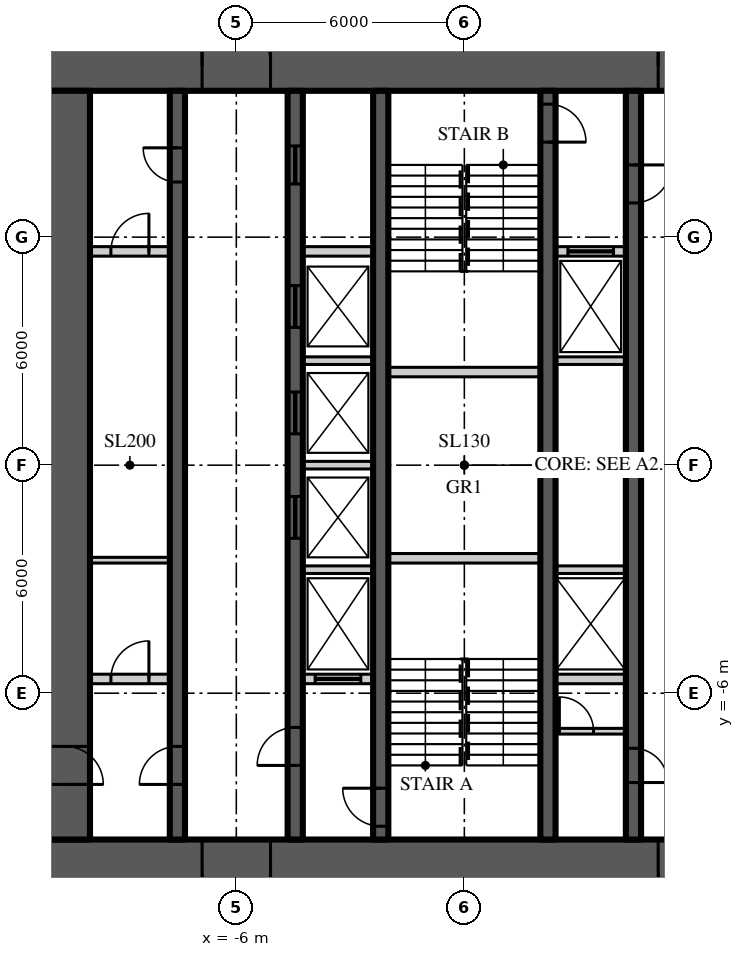
"""IFC4 building model, lengths in metres.
Left out: names, types, materials, properties, quantities, classifications, styles, units other than length and angle.
Written with IfcOpenShell. Run it as: python <this file> out.ifc"""

import sys

from ifc_helpers import new_model, si_unit, direction, frame, frame_2d, origin, place, context, subcontext, project, spatial, rectangle, extrude, element, fill, save


model = new_model("IFC4")
c1 = context("Model", 3, precision=1e-05, world=origin(), true_north=direction((0.0, 1.0)))
c2 = subcontext(c1, "Body", "Model", "MODEL_VIEW")
j1 = project(units=[si_unit("LENGTHUNIT", "METRE"), si_unit("PLANEANGLEUNIT", "RADIAN")], contexts=[c1])
p1 = place(None, origin())
s1 = spatial("IfcSite", under=j1, at=p1, CompositionType="ELEMENT")
p2 = place(p1, origin())
s2 = spatial("IfcBuilding", under=s1, at=p2, CompositionType="ELEMENT")
p3 = place(p2, frame((0.0, 0.0, 132.0)))
s3 = spatial("IfcBuildingStorey", under=s2, at=p3, CompositionType="ELEMENT", Elevation=132.0)
p4 = place(p3, frame((-11.15, 10.5, 0.0), z_axis=(0.0, 0.0, 1.0), x_axis=(1.0, 0.0, 0.0)))
e1 = element("IfcWall", 1, at=p4, inside=s3, PredefinedType="SHEAR", context=c2, shape_type="SweptSolid", body=[
    extrude(rectangle(XDim=22.3, YDim=1.3, at=frame_2d((11.15, 0.0))), origin(), (0.0, 0.0, 1.0), 3.9),
])
p5 = place(p4, frame((4.25, 0.0, 0.0)))
e2 = element("IfcOpeningElement", 2, at=p5, cuts=e1, PredefinedType="OPENING", context=c2, shape_type="SweptSolid", body=[
    extrude(rectangle(XDim=1.8, YDim=2.2, at=frame_2d((0.9, 1.1))), frame((0.0, 0.66, 0.0), z_axis=(0.0, -1.0, 0.0), x_axis=(1.0, 0.0, 0.0)), (0.0, 0.0, 1.0), 1.32),
])
p6 = place(p4, frame((16.25, 0.0, 0.0)))
e3 = element("IfcOpeningElement", 3, at=p6, cuts=e1, PredefinedType="OPENING", context=c2, shape_type="SweptSolid", body=[
    extrude(rectangle(XDim=1.8, YDim=2.2, at=frame_2d((0.9, 1.1))), frame((0.0, 0.66, 0.0), z_axis=(0.0, -1.0, 0.0), x_axis=(1.0, 0.0, 0.0)), (0.0, 0.0, 1.0), 1.32),
])
p7 = place(p3, frame((11.15, -10.5, 0.0), z_axis=(0.0, 0.0, 1.0), x_axis=(-1.0, 0.0, 0.0)))
e4 = element("IfcWall", 4, at=p7, inside=s3, PredefinedType="SHEAR", context=c2, shape_type="SweptSolid", body=[
    extrude(rectangle(XDim=22.3, YDim=1.3, at=frame_2d((11.15, 0.0))), origin(), (0.0, 0.0, 1.0), 3.9),
])
p8 = place(p7, frame((16.25, 0.0, 0.0)))
e5 = element("IfcOpeningElement", 5, at=p8, cuts=e4, PredefinedType="OPENING", context=c2, shape_type="SweptSolid", body=[
    extrude(rectangle(XDim=1.8, YDim=2.2, at=frame_2d((0.9, 1.1))), frame((0.0, 0.66, 0.0), z_axis=(0.0, -1.0, 0.0), x_axis=(1.0, 0.0, 0.0)), (0.0, 0.0, 1.0), 1.32),
])
p9 = place(p7, frame((4.25, 0.0, 0.0)))
e6 = element("IfcOpeningElement", 6, at=p9, cuts=e4, PredefinedType="OPENING", context=c2, shape_type="SweptSolid", body=[
    extrude(rectangle(XDim=1.8, YDim=2.2, at=frame_2d((0.9, 1.1))), frame((0.0, 0.66, 0.0), z_axis=(0.0, -1.0, 0.0), x_axis=(1.0, 0.0, 0.0)), (0.0, 0.0, 1.0), 1.32),
])
p10 = place(p3, frame((-10.5, 9.85, 0.0), z_axis=(0.0, 0.0, 1.0), x_axis=(0.0, -1.0, 0.0)))
e7 = element("IfcWall", 7, at=p10, inside=s3, PredefinedType="SHEAR", context=c2, shape_type="SweptSolid", body=[
    extrude(rectangle(XDim=19.7, YDim=1.3, at=frame_2d((9.85, 0.0))), origin(), (0.0, 0.0, 1.0), 3.9),
])
p11 = place(p10, frame((17.25, 0.0, 0.0)))
e8 = element("IfcOpeningElement", 8, at=p11, cuts=e7, PredefinedType="OPENING", context=c2, shape_type="SweptSolid", body=[
    extrude(rectangle(XDim=1.0, YDim=2.2, at=frame_2d((0.5, 1.1))), frame((0.0, 0.66, 0.0), z_axis=(0.0, -1.0, 0.0), x_axis=(1.0, 0.0, 0.0)), (0.0, 0.0, 1.0), 1.32),
])
p12 = place(p3, frame((-7.55, -9.85, 0.0), z_axis=(0.0, 0.0, 1.0), x_axis=(0.0, 1.0, 0.0)))
e9 = element("IfcWall", 9, at=p12, inside=s3, PredefinedType="SHEAR", context=c2, shape_type="SweptSolid", body=[
    extrude(rectangle(XDim=19.7, YDim=0.4, at=frame_2d((9.85, 0.0))), origin(), (0.0, 0.0, 1.0), 3.9),
])
p13 = place(p12, frame((1.45, 0.0, 0.0)))
e10 = element("IfcOpeningElement", 10, at=p13, cuts=e9, PredefinedType="OPENING", context=c2, shape_type="SweptSolid", body=[
    extrude(rectangle(XDim=1.0, YDim=2.2, at=frame_2d((0.5, 1.1))), frame((0.0, 0.21, 0.0), z_axis=(0.0, -1.0, 0.0), x_axis=(1.0, 0.0, 0.0)), (0.0, 0.0, 1.0), 0.42),
])
p14 = place(p12, frame((17.3, 0.0, 0.0)))
e11 = element("IfcOpeningElement", 11, at=p14, cuts=e9, PredefinedType="OPENING", context=c2, shape_type="SweptSolid", body=[
    extrude(rectangle(XDim=0.9, YDim=2.1, at=frame_2d((0.45, 1.05))), frame((0.0, 0.21, 0.0), z_axis=(0.0, -1.0, 0.0), x_axis=(1.0, 0.0, 0.0)), (0.0, 0.0, 1.0), 0.42),
])
p15 = place(p3, frame((-4.45, -9.85, 0.0), z_axis=(0.0, 0.0, 1.0), x_axis=(0.0, 1.0, 0.0)))
e12 = element("IfcWall", 12, at=p15, inside=s3, PredefinedType="SHEAR", context=c2, shape_type="SweptSolid", body=[
    extrude(rectangle(XDim=19.7, YDim=0.4, at=frame_2d((9.85, 0.0))), origin(), (0.0, 0.0, 1.0), 3.9),
])
p16 = place(p15, frame((1.95, 0.0, 0.0)))
e13 = element("IfcOpeningElement", 13, at=p16, cuts=e12, PredefinedType="OPENING", context=c2, shape_type="SweptSolid", body=[
    extrude(rectangle(XDim=1.0, YDim=2.2, at=frame_2d((0.5, 1.1))), frame((0.0, 0.21, 0.0), z_axis=(0.0, -1.0, 0.0), x_axis=(1.0, 0.0, 0.0)), (0.0, 0.0, 1.0), 0.42),
])
p17 = place(p15, frame((17.25, 0.0, 0.0)))
e14 = element("IfcOpeningElement", 14, at=p17, cuts=e12, PredefinedType="OPENING", context=c2, shape_type="SweptSolid", body=[
    extrude(rectangle(XDim=1.0, YDim=2.1, at=frame_2d((0.5, 1.05))), frame((0.0, 0.21, 0.0), z_axis=(0.0, -1.0, 0.0), x_axis=(1.0, 0.0, 0.0)), (0.0, 0.0, 1.0), 0.42),
])
p18 = place(p15, frame((7.925, 0.0, 0.0)))
e15 = element("IfcOpeningElement", 15, at=p18, cuts=e12, PredefinedType="OPENING", context=c2, shape_type="SweptSolid", body=[
    extrude(rectangle(XDim=1.1, YDim=2.2, at=frame_2d((0.55, 1.1))), frame((0.0, 0.21, 0.0), z_axis=(0.0, -1.0, 0.0), x_axis=(1.0, 0.0, 0.0)), (0.0, 0.0, 1.0), 0.42),
])
p19 = place(p15, frame((10.675, 0.0, 0.0)))
e16 = element("IfcOpeningElement", 16, at=p19, cuts=e12, PredefinedType="OPENING", context=c2, shape_type="SweptSolid", body=[
    extrude(rectangle(XDim=1.1, YDim=2.2, at=frame_2d((0.55, 1.1))), frame((0.0, 0.21, 0.0), z_axis=(0.0, -1.0, 0.0), x_axis=(1.0, 0.0, 0.0)), (0.0, 0.0, 1.0), 0.42),
])
p20 = place(p15, frame((13.475, 0.0, 0.0)))
e17 = element("IfcOpeningElement", 17, at=p20, cuts=e12, PredefinedType="OPENING", context=c2, shape_type="SweptSolid", body=[
    extrude(rectangle(XDim=1.1, YDim=2.2, at=frame_2d((0.55, 1.1))), frame((0.0, 0.21, 0.0), z_axis=(0.0, -1.0, 0.0), x_axis=(1.0, 0.0, 0.0)), (0.0, 0.0, 1.0), 0.42),
])
p21 = place(p3, frame((4.45, 9.85, 0.0), z_axis=(0.0, 0.0, 1.0), x_axis=(0.0, -1.0, 0.0)))
e18 = element("IfcWall", 18, at=p21, inside=s3, PredefinedType="SHEAR", context=c2, shape_type="SweptSolid", body=[
    extrude(rectangle(XDim=19.7, YDim=0.4, at=frame_2d((9.85, 0.0))), origin(), (0.0, 0.0, 1.0), 3.9),
])
p22 = place(p21, frame((1.95, 0.0, 0.0)))
e19 = element("IfcOpeningElement", 19, at=p22, cuts=e18, PredefinedType="OPENING", context=c2, shape_type="SweptSolid", body=[
    extrude(rectangle(XDim=1.0, YDim=2.2, at=frame_2d((0.5, 1.1))), frame((0.0, 0.21, 0.0), z_axis=(0.0, -1.0, 0.0), x_axis=(1.0, 0.0, 0.0)), (0.0, 0.0, 1.0), 0.42),
])
p23 = place(p21, frame((17.3, 0.0, 0.0)))
e20 = element("IfcOpeningElement", 20, at=p23, cuts=e18, PredefinedType="OPENING", context=c2, shape_type="SweptSolid", body=[
    extrude(rectangle(XDim=0.9, YDim=2.1, at=frame_2d((0.45, 1.05))), frame((0.0, 0.21, 0.0), z_axis=(0.0, -1.0, 0.0), x_axis=(1.0, 0.0, 0.0)), (0.0, 0.0, 1.0), 0.42),
])
p24 = place(p3, frame((-2.2, -9.85, 0.0), z_axis=(0.0, 0.0, 1.0), x_axis=(0.0, 1.0, 0.0)))
e21 = element("IfcWall", 21, at=p24, inside=s3, PredefinedType="SHEAR", context=c2, shape_type="SweptSolid", body=[
    extrude(rectangle(XDim=19.7, YDim=0.4, at=frame_2d((9.85, 0.0))), origin(), (0.0, 0.0, 1.0), 3.9),
])
p25 = place(p24, frame((0.35, 0.0, 0.0)))
e22 = element("IfcOpeningElement", 22, at=p25, cuts=e21, PredefinedType="OPENING", context=c2, shape_type="SweptSolid", body=[
    extrude(rectangle(XDim=1.0, YDim=2.2, at=frame_2d((0.5, 1.1))), frame((0.0, 0.21, 0.0), z_axis=(0.0, -1.0, 0.0), x_axis=(1.0, 0.0, 0.0)), (0.0, 0.0, 1.0), 0.42),
])
p26 = place(p3, frame((2.2, 9.85, 0.0), z_axis=(0.0, 0.0, 1.0), x_axis=(0.0, -1.0, 0.0)))
e23 = element("IfcWall", 23, at=p26, inside=s3, PredefinedType="SHEAR", context=c2, shape_type="SweptSolid", body=[
    extrude(rectangle(XDim=19.7, YDim=0.4, at=frame_2d((9.85, 0.0))), origin(), (0.0, 0.0, 1.0), 3.9),
])
p27 = place(p26, frame((0.35, 0.0, 0.0)))
e24 = element("IfcOpeningElement", 24, at=p27, cuts=e23, PredefinedType="OPENING", context=c2, shape_type="SweptSolid", body=[
    extrude(rectangle(XDim=1.0, YDim=2.2, at=frame_2d((0.5, 1.1))), frame((0.0, 0.21, 0.0), z_axis=(0.0, -1.0, 0.0), x_axis=(1.0, 0.0, 0.0)), (0.0, 0.0, 1.0), 0.42),
])
p28 = place(p3, frame((-9.85, 5.625, 0.0), z_axis=(0.0, 0.0, 1.0), x_axis=(1.0, 0.0, 0.0)))
e25 = element("IfcWall", 25, at=p28, inside=s3, PredefinedType="SOLIDWALL", context=c2, shape_type="SweptSolid", body=[
    extrude(rectangle(XDim=2.1, YDim=0.25, at=frame_2d((1.05, 0.0))), origin(), (0.0, 0.0, 1.0), 3.7),
])
p29 = place(p28, frame((0.55, 0.0, 0.0)))
e26 = element("IfcOpeningElement", 26, at=p29, cuts=e25, PredefinedType="OPENING", context=c2, shape_type="SweptSolid", body=[
    extrude(rectangle(XDim=1.0, YDim=2.2, at=frame_2d((0.5, 1.1))), frame((0.0, 0.135, 0.0), z_axis=(0.0, -1.0, 0.0), x_axis=(1.0, 0.0, 0.0)), (0.0, 0.0, 1.0), 0.27),
])
p30 = place(p3, frame((-4.25, 5.625, 0.0), z_axis=(0.0, 0.0, 1.0), x_axis=(1.0, 0.0, 0.0)))
e27 = element("IfcWall", 27, at=p30, inside=s3, PredefinedType="SOLIDWALL", context=c2, shape_type="SweptSolid", body=[
    extrude(rectangle(XDim=1.85, YDim=0.25, at=frame_2d((0.925, 0.0))), origin(), (0.0, 0.0, 1.0), 3.7),
])
p31 = place(p3, frame((2.4, 5.625, 0.0), z_axis=(0.0, 0.0, 1.0), x_axis=(1.0, 0.0, 0.0)))
e28 = element("IfcWall", 28, at=p31, inside=s3, PredefinedType="SOLIDWALL", context=c2, shape_type="SweptSolid", body=[
    extrude(rectangle(XDim=1.85, YDim=0.25, at=frame_2d((0.925, 0.0))), origin(), (0.0, 0.0, 1.0), 3.7),
])
p32 = place(p31, frame((0.325, 0.0, 0.0)))
e29 = element("IfcOpeningElement", 29, at=p32, cuts=e28, PredefinedType="OPENING", context=c2, shape_type="SweptSolid", body=[
    extrude(rectangle(XDim=1.2, YDim=2.2, at=frame_2d((0.6, 1.1))), frame((0.0, 0.135, 0.0), z_axis=(0.0, -1.0, 0.0), x_axis=(1.0, 0.0, 0.0)), (0.0, 0.0, 1.0), 0.27),
])
p33 = place(p3, frame((-9.85, -5.625, 0.0), z_axis=(0.0, 0.0, 1.0), x_axis=(1.0, 0.0, 0.0)))
e30 = element("IfcWall", 30, at=p33, inside=s3, PredefinedType="SOLIDWALL", context=c2, shape_type="SweptSolid", body=[
    extrude(rectangle(XDim=2.1, YDim=0.25, at=frame_2d((1.05, 0.0))), origin(), (0.0, 0.0, 1.0), 3.7),
])
p34 = place(p33, frame((0.55, 0.0, 0.0)))
e31 = element("IfcOpeningElement", 31, at=p34, cuts=e30, PredefinedType="OPENING", context=c2, shape_type="SweptSolid", body=[
    extrude(rectangle(XDim=1.0, YDim=2.2, at=frame_2d((0.5, 1.1))), frame((0.0, 0.135, 0.0), z_axis=(0.0, -1.0, 0.0), x_axis=(1.0, 0.0, 0.0)), (0.0, 0.0, 1.0), 0.27),
])
p35 = place(p3, frame((-4.25, -5.625, 0.0), z_axis=(0.0, 0.0, 1.0), x_axis=(1.0, 0.0, 0.0)))
e32 = element("IfcWall", 32, at=p35, inside=s3, PredefinedType="SOLIDWALL", context=c2, shape_type="SweptSolid", body=[
    extrude(rectangle(XDim=1.85, YDim=0.25, at=frame_2d((0.925, 0.0))), origin(), (0.0, 0.0, 1.0), 3.7),
])
p36 = place(p35, frame((0.325, 0.0, 0.0)))
e33 = element("IfcOpeningElement", 33, at=p36, cuts=e32, PredefinedType="OPENING", context=c2, shape_type="SweptSolid", body=[
    extrude(rectangle(XDim=1.2, YDim=2.2, at=frame_2d((0.6, 1.1))), frame((0.0, 0.135, 0.0), z_axis=(0.0, -1.0, 0.0), x_axis=(1.0, 0.0, 0.0)), (0.0, 0.0, 1.0), 0.27),
])
p37 = place(p3, frame((2.4, -5.625, 0.0), z_axis=(0.0, 0.0, 1.0), x_axis=(1.0, 0.0, 0.0)))
e34 = element("IfcWall", 34, at=p37, inside=s3, PredefinedType="SOLIDWALL", context=c2, shape_type="SweptSolid", body=[
    extrude(rectangle(XDim=1.85, YDim=0.25, at=frame_2d((0.925, 0.0))), origin(), (0.0, 0.0, 1.0), 3.7),
])
for number, where, z_axis, x_axis in (
    (35, (-2.0, -2.45, 0.0), (0.0, 0.0, 1.0), (1.0, 0.0, 0.0)),
    (36, (-2.0, 2.45, 0.0), (0.0, 0.0, 1.0), (1.0, 0.0, 0.0)),
):
    element("IfcWall", number, at=place(p3, frame(where, z_axis=z_axis, x_axis=x_axis)), inside=s3, PredefinedType="SOLIDWALL", context=c2, shape_type="SweptSolid", body=[
        extrude(rectangle(XDim=4.0, YDim=0.25, at=frame_2d((2.0, 0.0))), origin(), (0.0, 0.0, 1.0), 3.7),
    ])
for number, where, z_axis, x_axis in (
    (37, (-4.25, -2.75, 0.0), (0.0, 0.0, 1.0), (1.0, 0.0, 0.0)),
    (38, (2.4, -2.75, 0.0), (0.0, 0.0, 1.0), (1.0, 0.0, 0.0)),
    (39, (-4.25, 0.0, 0.0), (0.0, 0.0, 1.0), (1.0, 0.0, 0.0)),
    (40, (-4.25, 2.75, 0.0), (0.0, 0.0, 1.0), (1.0, 0.0, 0.0)),
    (41, (2.4, 2.75, 0.0), (0.0, 0.0, 1.0), (1.0, 0.0, 0.0)),
):
    element("IfcWall", number, at=place(p3, frame(where, z_axis=z_axis, x_axis=x_axis)), inside=s3, PredefinedType="SOLIDWALL", context=c2, shape_type="SweptSolid", body=[
        extrude(rectangle(XDim=1.85, YDim=0.2, at=frame_2d((0.925, 0.0))), origin(), (0.0, 0.0, 1.0), 3.7),
    ])
p38 = place(p3, frame((-9.85, -2.5, 0.0), z_axis=(0.0, 0.0, 1.0), x_axis=(1.0, 0.0, 0.0)))
e42 = element("IfcWall", 42, at=p38, inside=s3, PredefinedType="SOLIDWALL", context=c2, shape_type="SweptSolid", body=[
    extrude(rectangle(XDim=2.1, YDim=0.15, at=frame_2d((1.05, 0.0))), origin(), (0.0, 0.0, 1.0), 3.77),
])
p39 = place(p3, frame((2.4, -7.0, 0.0), z_axis=(0.0, 0.0, 1.0), x_axis=(1.0, 0.0, 0.0)))
e43 = element("IfcWall", 43, at=p39, inside=s3, PredefinedType="SOLIDWALL", context=c2, shape_type="SweptSolid", body=[
    extrude(rectangle(XDim=1.85, YDim=0.15, at=frame_2d((0.925, 0.0))), origin(), (0.0, 0.0, 1.0), 3.77),
])
p40 = place(p39, frame((0.1, 0.0, 0.0)))
e44 = element("IfcOpeningElement", 44, at=p40, cuts=e43, PredefinedType="OPENING", context=c2, shape_type="SweptSolid", body=[
    extrude(rectangle(XDim=0.9, YDim=2.1, at=frame_2d((0.45, 1.05))), frame((0.0, 0.085, 0.0), z_axis=(0.0, -1.0, 0.0), x_axis=(1.0, 0.0, 0.0)), (0.0, 0.0, 1.0), 0.17),
])
p41 = place(p5, origin())
e45 = element("IfcDoor", 45, at=p41, inside=s3, OperationType="DOUBLE_DOOR_DOUBLE_SWING", PredefinedType="DOOR", context=c2, shape_type="SweptSolid", body=[
    extrude(rectangle(XDim=1.8, YDim=2.2, at=frame_2d((0.9, 1.1))), frame((0.0, 0.025, 0.0), z_axis=(0.0, -1.0, 0.0), x_axis=(1.0, 0.0, 0.0)), (0.0, 0.0, 1.0), 0.05),
])
fill(e2, e45)
p42 = place(p8, origin())
e46 = element("IfcDoor", 46, at=p42, inside=s3, OperationType="DOUBLE_DOOR_DOUBLE_SWING", PredefinedType="DOOR", context=c2, shape_type="SweptSolid", body=[
    extrude(rectangle(XDim=1.8, YDim=2.2, at=frame_2d((0.9, 1.1))), frame((0.0, 0.025, 0.0), z_axis=(0.0, -1.0, 0.0), x_axis=(1.0, 0.0, 0.0)), (0.0, 0.0, 1.0), 0.05),
])
fill(e5, e46)
p43 = place(p6, origin())
e47 = element("IfcDoor", 47, at=p43, inside=s3, OperationType="DOUBLE_DOOR_DOUBLE_SWING", PredefinedType="DOOR", context=c2, shape_type="SweptSolid", body=[
    extrude(rectangle(XDim=1.8, YDim=2.2, at=frame_2d((0.9, 1.1))), frame((0.0, 0.025, 0.0), z_axis=(0.0, -1.0, 0.0), x_axis=(1.0, 0.0, 0.0)), (0.0, 0.0, 1.0), 0.05),
])
fill(e3, e47)
p44 = place(p9, origin())
e48 = element("IfcDoor", 48, at=p44, inside=s3, OperationType="DOUBLE_DOOR_DOUBLE_SWING", PredefinedType="DOOR", context=c2, shape_type="SweptSolid", body=[
    extrude(rectangle(XDim=1.8, YDim=2.2, at=frame_2d((0.9, 1.1))), frame((0.0, 0.025, 0.0), z_axis=(0.0, -1.0, 0.0), x_axis=(1.0, 0.0, 0.0)), (0.0, 0.0, 1.0), 0.05),
])
fill(e6, e48)
p45 = place(p13, origin())
e49 = element("IfcDoor", 49, at=p45, inside=s3, OperationType="SINGLE_SWING_LEFT", PredefinedType="DOOR", context=c2, shape_type="SweptSolid", body=[
    extrude(rectangle(XDim=1.0, YDim=2.2, at=frame_2d((0.5, 1.1))), frame((0.0, 0.025, 0.0), z_axis=(0.0, -1.0, 0.0), x_axis=(1.0, 0.0, 0.0)), (0.0, 0.0, 1.0), 0.05),
])
fill(e10, e49)
p46 = place(p11, origin())
e50 = element("IfcDoor", 50, at=p46, inside=s3, OperationType="SINGLE_SWING_RIGHT", PredefinedType="DOOR", context=c2, shape_type="SweptSolid", body=[
    extrude(rectangle(XDim=1.0, YDim=2.2, at=frame_2d((0.5, 1.1))), frame((0.0, 0.025, 0.0), z_axis=(0.0, -1.0, 0.0), x_axis=(1.0, 0.0, 0.0)), (0.0, 0.0, 1.0), 0.05),
])
fill(e8, e50)
p47 = place(p16, origin())
e51 = element("IfcDoor", 51, at=p47, inside=s3, OperationType="SINGLE_SWING_LEFT", PredefinedType="DOOR", context=c2, shape_type="SweptSolid", body=[
    extrude(rectangle(XDim=1.0, YDim=2.2, at=frame_2d((0.5, 1.1))), frame((0.0, 0.025, 0.0), z_axis=(0.0, -1.0, 0.0), x_axis=(1.0, 0.0, 0.0)), (0.0, 0.0, 1.0), 0.05),
])
fill(e13, e51)
p48 = place(p25, origin())
e52 = element("IfcDoor", 52, at=p48, inside=s3, OperationType="SINGLE_SWING_RIGHT", PredefinedType="DOOR", context=c2, shape_type="SweptSolid", body=[
    extrude(rectangle(XDim=1.0, YDim=2.2, at=frame_2d((0.5, 1.1))), frame((0.0, 0.025, 0.0), z_axis=(0.0, -1.0, 0.0), x_axis=(1.0, 0.0, 0.0)), (0.0, 0.0, 1.0), 0.05),
])
fill(e22, e52)
p49 = place(p22, origin())
e53 = element("IfcDoor", 53, at=p49, inside=s3, OperationType="SINGLE_SWING_LEFT", PredefinedType="DOOR", context=c2, shape_type="SweptSolid", body=[
    extrude(rectangle(XDim=1.0, YDim=2.2, at=frame_2d((0.5, 1.1))), frame((0.0, 0.025, 0.0), z_axis=(0.0, -1.0, 0.0), x_axis=(1.0, 0.0, 0.0)), (0.0, 0.0, 1.0), 0.05),
])
fill(e19, e53)
p50 = place(p27, origin())
e54 = element("IfcDoor", 54, at=p50, inside=s3, OperationType="SINGLE_SWING_RIGHT", PredefinedType="DOOR", context=c2, shape_type="SweptSolid", body=[
    extrude(rectangle(XDim=1.0, YDim=2.2, at=frame_2d((0.5, 1.1))), frame((0.0, 0.025, 0.0), z_axis=(0.0, -1.0, 0.0), x_axis=(1.0, 0.0, 0.0)), (0.0, 0.0, 1.0), 0.05),
])
fill(e24, e54)
p51 = place(p14, origin())
e55 = element("IfcDoor", 55, at=p51, inside=s3, OperationType="SINGLE_SWING_RIGHT", PredefinedType="DOOR", context=c2, shape_type="SweptSolid", body=[
    extrude(rectangle(XDim=0.9, YDim=2.1, at=frame_2d((0.45, 1.05))), frame((0.0, 0.025, 0.0), z_axis=(0.0, -1.0, 0.0), x_axis=(1.0, 0.0, 0.0)), (0.0, 0.0, 1.0), 0.05),
])
fill(e11, e55)
p52 = place(p17, origin())
e56 = element("IfcDoor", 56, at=p52, inside=s3, OperationType="SLIDING_TO_LEFT", PredefinedType="DOOR", context=c2, shape_type="SweptSolid", body=[
    extrude(rectangle(XDim=1.0, YDim=2.1, at=frame_2d((0.5, 1.05))), frame((0.0, 0.025, 0.0), z_axis=(0.0, -1.0, 0.0), x_axis=(1.0, 0.0, 0.0)), (0.0, 0.0, 1.0), 0.05),
])
fill(e14, e56)
p53 = place(p23, origin())
e57 = element("IfcDoor", 57, at=p53, inside=s3, OperationType="SINGLE_SWING_RIGHT", PredefinedType="DOOR", context=c2, shape_type="SweptSolid", body=[
    extrude(rectangle(XDim=0.9, YDim=2.1, at=frame_2d((0.45, 1.05))), frame((0.0, 0.025, 0.0), z_axis=(0.0, -1.0, 0.0), x_axis=(1.0, 0.0, 0.0)), (0.0, 0.0, 1.0), 0.05),
])
fill(e20, e57)
p54 = place(p18, origin())
e58 = element("IfcDoor", 58, at=p54, inside=s3, OperationType="SLIDING_TO_LEFT", PredefinedType="DOOR", context=c2, shape_type="SweptSolid", body=[
    extrude(rectangle(XDim=1.1, YDim=2.2, at=frame_2d((0.55, 1.1))), frame((0.0, 0.025, 0.0), z_axis=(0.0, -1.0, 0.0), x_axis=(1.0, 0.0, 0.0)), (0.0, 0.0, 1.0), 0.05),
])
fill(e15, e58)
p55 = place(p19, origin())
e59 = element("IfcDoor", 59, at=p55, inside=s3, OperationType="SLIDING_TO_LEFT", PredefinedType="DOOR", context=c2, shape_type="SweptSolid", body=[
    extrude(rectangle(XDim=1.1, YDim=2.2, at=frame_2d((0.55, 1.1))), frame((0.0, 0.025, 0.0), z_axis=(0.0, -1.0, 0.0), x_axis=(1.0, 0.0, 0.0)), (0.0, 0.0, 1.0), 0.05),
])
fill(e16, e59)
p56 = place(p20, origin())
e60 = element("IfcDoor", 60, at=p56, inside=s3, OperationType="SLIDING_TO_LEFT", PredefinedType="DOOR", context=c2, shape_type="SweptSolid", body=[
    extrude(rectangle(XDim=1.1, YDim=2.2, at=frame_2d((0.55, 1.1))), frame((0.0, 0.025, 0.0), z_axis=(0.0, -1.0, 0.0), x_axis=(1.0, 0.0, 0.0)), (0.0, 0.0, 1.0), 0.05),
])
fill(e17, e60)
p57 = place(p36, origin())
e61 = element("IfcDoor", 61, at=p57, inside=s3, OperationType="SLIDING_TO_LEFT", PredefinedType="DOOR", context=c2, shape_type="SweptSolid", body=[
    extrude(rectangle(XDim=1.2, YDim=2.2, at=frame_2d((0.6, 1.1))), frame((0.0, 0.025, 0.0), z_axis=(0.0, -1.0, 0.0), x_axis=(1.0, 0.0, 0.0)), (0.0, 0.0, 1.0), 0.05),
])
fill(e33, e61)
p58 = place(p32, origin())
e62 = element("IfcDoor", 62, at=p58, inside=s3, OperationType="SLIDING_TO_LEFT", PredefinedType="DOOR", context=c2, shape_type="SweptSolid", body=[
    extrude(rectangle(XDim=1.2, YDim=2.2, at=frame_2d((0.6, 1.1))), frame((0.0, 0.025, 0.0), z_axis=(0.0, -1.0, 0.0), x_axis=(1.0, 0.0, 0.0)), (0.0, 0.0, 1.0), 0.05),
])
fill(e29, e62)
p59 = place(p29, origin())
e63 = element("IfcDoor", 63, at=p59, inside=s3, OperationType="SINGLE_SWING_RIGHT", PredefinedType="DOOR", context=c2, shape_type="SweptSolid", body=[
    extrude(rectangle(XDim=1.0, YDim=2.2, at=frame_2d((0.5, 1.1))), frame((0.0, 0.025, 0.0), z_axis=(0.0, -1.0, 0.0), x_axis=(1.0, 0.0, 0.0)), (0.0, 0.0, 1.0), 0.05),
])
fill(e26, e63)
p60 = place(p34, origin())
e64 = element("IfcDoor", 64, at=p60, inside=s3, OperationType="SINGLE_SWING_RIGHT", PredefinedType="DOOR", context=c2, shape_type="SweptSolid", body=[
    extrude(rectangle(XDim=1.0, YDim=2.2, at=frame_2d((0.5, 1.1))), frame((0.0, 0.025, 0.0), z_axis=(0.0, -1.0, 0.0), x_axis=(1.0, 0.0, 0.0)), (0.0, 0.0, 1.0), 0.05),
])
fill(e31, e64)
p61 = place(p40, origin())
e65 = element("IfcDoor", 65, at=p61, inside=s3, OperationType="SINGLE_SWING_LEFT", PredefinedType="DOOR", context=c2, shape_type="SweptSolid", body=[
    extrude(rectangle(XDim=0.9, YDim=2.1, at=frame_2d((0.45, 1.05))), frame((0.0, 0.025, 0.0), z_axis=(0.0, -1.0, 0.0), x_axis=(1.0, 0.0, 0.0)), (0.0, 0.0, 1.0), 0.05),
])
fill(e44, e65)
save(model, sys.argv[1])
